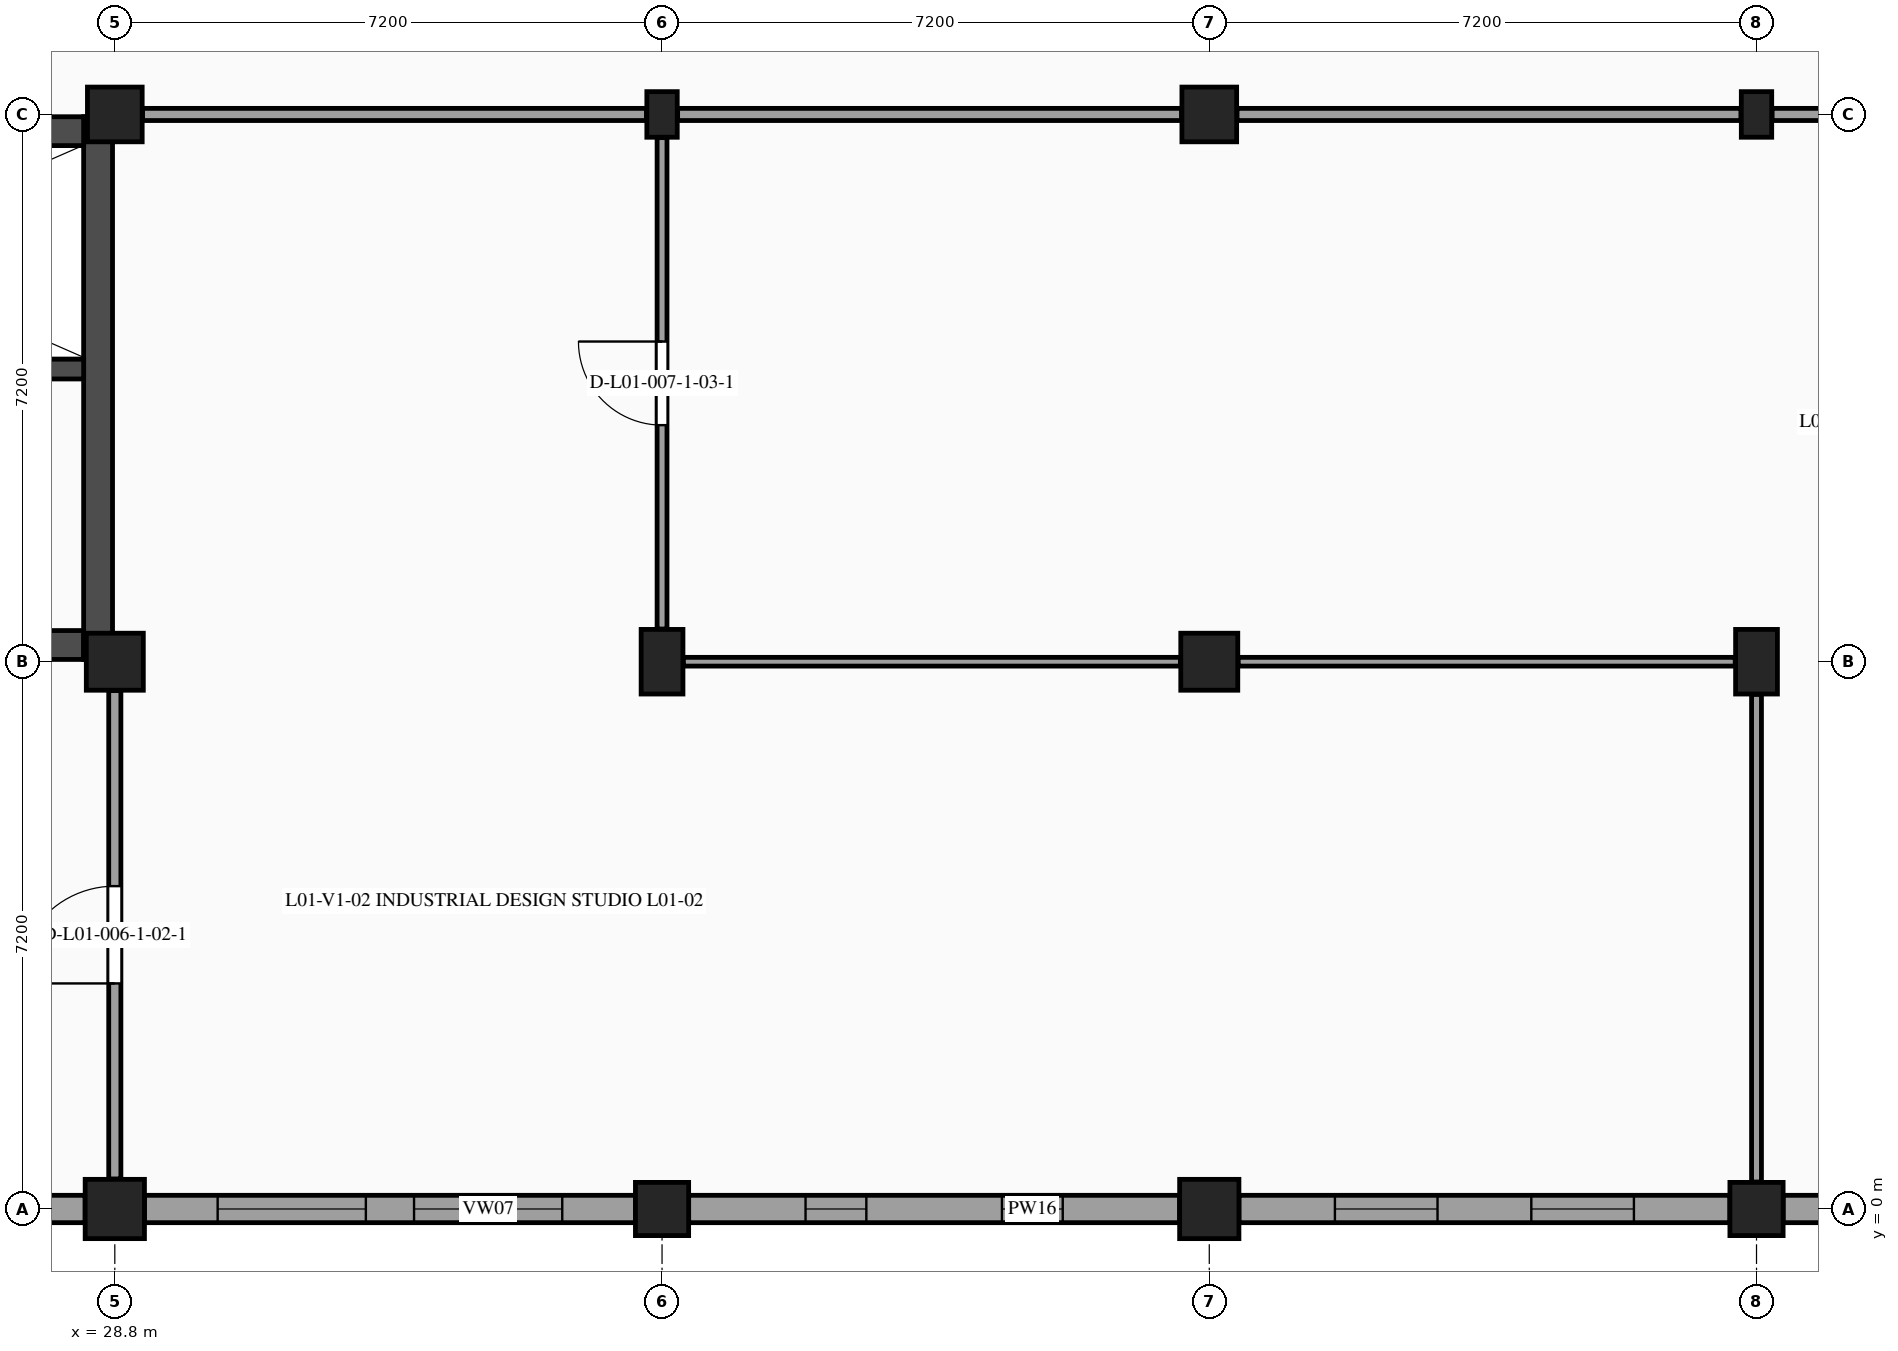
"""IFC4 building model, lengths in metres.
Left out: names, types, materials, properties, quantities, classifications, styles, units other than length and angle.
Written with IfcOpenShell. Run it as: python <this file> out.ifc"""

import sys

from ifc_helpers import new_model, si_unit, direction, frame, frame_2d, origin, origin_2d, place, context, subcontext, project, spatial, rectangle, extrude, element, fill, save


model = new_model("IFC4")
c1 = context("Model", 3, precision=1e-05, world=origin(), true_north=direction((0.0, 1.0)))
c2 = subcontext(c1, "Body", "Model", "MODEL_VIEW")
j1 = project(units=[si_unit("LENGTHUNIT", "METRE"), si_unit("PLANEANGLEUNIT", "RADIAN")], contexts=[c1])
p1 = place(None, origin())
s1 = spatial("IfcSite", under=j1, at=p1, CompositionType="ELEMENT")
p2 = place(p1, origin())
s2 = spatial("IfcBuilding", under=s1, at=p2, CompositionType="ELEMENT")
p3 = place(p2, frame((0.0, 0.0, 5.4)))
s3 = spatial("IfcBuildingStorey", under=s2, at=p3, CompositionType="ELEMENT", Elevation=5.4)
p4 = place(p3, frame((28.8, 0.0, 0.0), z_axis=(0.0, 0.0, 1.0), x_axis=(1.0, 0.0, 0.0)))
e1 = element("IfcColumn", 1, at=p4, inside=s3, PredefinedType="COLUMN", context=c2, shape_type="SweptSolid", body=[
    extrude(rectangle(XDim=0.78, YDim=0.78, at=origin_2d()), origin(), (0.0, 0.0, 1.0), 4.5),
])
p5 = place(p3, frame((28.8, 7.2, 0.0), z_axis=(0.0, 0.0, 1.0), x_axis=(1.0, 0.0, 0.0)))
e2 = element("IfcColumn", 2, at=p5, inside=s3, PredefinedType="COLUMN", context=c2, shape_type="SweptSolid", body=[
    extrude(rectangle(XDim=0.75, YDim=0.75, at=origin_2d()), origin(), (0.0, 0.0, 1.0), 4.5),
])
p6 = place(p3, frame((28.8, 14.4, 0.0), z_axis=(0.0, 0.0, 1.0), x_axis=(1.0, 0.0, 0.0)))
e3 = element("IfcColumn", 3, at=p6, inside=s3, PredefinedType="COLUMN", context=c2, shape_type="SweptSolid", body=[
    extrude(rectangle(XDim=0.72, YDim=0.72, at=origin_2d()), origin(), (0.0, 0.0, 1.0), 4.5),
])
p7 = place(p3, frame((36.0, 0.0, 0.0), z_axis=(0.0, 0.0, 1.0), x_axis=(1.0, 0.0, 0.0)))
e4 = element("IfcColumn", 4, at=p7, inside=s3, PredefinedType="COLUMN", context=c2, shape_type="SweptSolid", body=[
    extrude(rectangle(XDim=0.7, YDim=0.7, at=origin_2d()), origin(), (0.0, 0.0, 1.0), 4.5),
])
p8 = place(p3, frame((36.0, 7.2, 0.0), z_axis=(0.0, 0.0, 1.0), x_axis=(1.0, 0.0, 0.0)))
e5 = element("IfcColumn", 5, at=p8, inside=s3, PredefinedType="COLUMN", context=c2, shape_type="SweptSolid", body=[
    extrude(rectangle(XDim=0.55, YDim=0.85, at=origin_2d()), origin(), (0.0, 0.0, 1.0), 4.5),
])
p9 = place(p3, frame((36.0, 14.4, 0.0), z_axis=(0.0, 0.0, 1.0), x_axis=(1.0, 0.0, 0.0)))
e6 = element("IfcColumn", 6, at=p9, inside=s3, PredefinedType="PILASTER", context=c2, shape_type="SweptSolid", body=[
    extrude(rectangle(XDim=0.4, YDim=0.6, at=origin_2d()), origin(), (0.0, 0.0, 1.0), 4.5),
])
p10 = place(p3, frame((43.2, 0.0, 0.0), z_axis=(0.0, 0.0, 1.0), x_axis=(1.0, 0.0, 0.0)))
e7 = element("IfcColumn", 7, at=p10, inside=s3, PredefinedType="COLUMN", context=c2, shape_type="SweptSolid", body=[
    extrude(rectangle(XDim=0.78, YDim=0.78, at=origin_2d()), origin(), (0.0, 0.0, 1.0), 4.5),
])
p11 = place(p3, frame((43.2, 7.2, 0.0), z_axis=(0.0, 0.0, 1.0), x_axis=(1.0, 0.0, 0.0)))
e8 = element("IfcColumn", 8, at=p11, inside=s3, PredefinedType="COLUMN", context=c2, shape_type="SweptSolid", body=[
    extrude(rectangle(XDim=0.75, YDim=0.75, at=origin_2d()), origin(), (0.0, 0.0, 1.0), 4.5),
])
p12 = place(p3, frame((43.2, 14.4, 0.0), z_axis=(0.0, 0.0, 1.0), x_axis=(1.0, 0.0, 0.0)))
e9 = element("IfcColumn", 9, at=p12, inside=s3, PredefinedType="COLUMN", context=c2, shape_type="SweptSolid", body=[
    extrude(rectangle(XDim=0.72, YDim=0.72, at=origin_2d()), origin(), (0.0, 0.0, 1.0), 4.5),
])
p13 = place(p3, frame((50.4, 0.0, 0.0), z_axis=(0.0, 0.0, 1.0), x_axis=(1.0, 0.0, 0.0)))
e10 = element("IfcColumn", 10, at=p13, inside=s3, PredefinedType="COLUMN", context=c2, shape_type="SweptSolid", body=[
    extrude(rectangle(XDim=0.7, YDim=0.7, at=origin_2d()), origin(), (0.0, 0.0, 1.0), 4.5),
])
p14 = place(p3, frame((50.4, 7.2, 0.0), z_axis=(0.0, 0.0, 1.0), x_axis=(1.0, 0.0, 0.0)))
e11 = element("IfcColumn", 11, at=p14, inside=s3, PredefinedType="COLUMN", context=c2, shape_type="SweptSolid", body=[
    extrude(rectangle(XDim=0.55, YDim=0.85, at=origin_2d()), origin(), (0.0, 0.0, 1.0), 4.5),
])
p15 = place(p3, frame((50.4, 14.4, 0.0), z_axis=(0.0, 0.0, 1.0), x_axis=(1.0, 0.0, 0.0)))
e12 = element("IfcColumn", 12, at=p15, inside=s3, PredefinedType="PILASTER", context=c2, shape_type="SweptSolid", body=[
    extrude(rectangle(XDim=0.4, YDim=0.6, at=origin_2d()), origin(), (0.0, 0.0, 1.0), 4.5),
])
p16 = place(p3, frame((57.225, 0.0, 0.0), z_axis=(0.0, 0.0, 1.0), x_axis=(-1.0, 0.0, 0.0)))
e13 = element("IfcWall", 13, at=p16, inside=s3, PredefinedType="STANDARD", context=c2, shape_type="SweptSolid", body=[
    extrude(rectangle(XDim=6.475, YDim=0.36, at=frame_2d((3.238, 0.0))), origin(), (0.0, 0.0, 1.0), 3.49),
])
p17 = place(p16, frame((1.192, 0.0, 1.15)))
e14 = element("IfcOpeningElement", 14, at=p17, cuts=e13, PredefinedType="OPENING", context=c2, shape_type="SweptSolid", body=[
    extrude(rectangle(XDim=1.5, YDim=1.2, at=frame_2d((0.75, 0.6))), frame((0.0, 0.19, 0.0), z_axis=(0.0, -1.0, 0.0), x_axis=(1.0, 0.0, 0.0)), (0.0, 0.0, 1.0), 0.38),
])
p18 = place(p16, frame((3.782, 0.0, 1.15)))
e15 = element("IfcOpeningElement", 15, at=p18, cuts=e13, PredefinedType="OPENING", context=c2, shape_type="SweptSolid", body=[
    extrude(rectangle(XDim=1.5, YDim=1.2, at=frame_2d((0.75, 0.6))), frame((0.0, 0.19, 0.0), z_axis=(0.0, -1.0, 0.0), x_axis=(1.0, 0.0, 0.0)), (0.0, 0.0, 1.0), 0.38),
])
p19 = place(p3, frame((50.05, 0.0, 0.0), z_axis=(0.0, 0.0, 1.0), x_axis=(-1.0, 0.0, 0.0)))
e16 = element("IfcWall", 16, at=p19, inside=s3, PredefinedType="STANDARD", context=c2, shape_type="SweptSolid", body=[
    extrude(rectangle(XDim=6.46, YDim=0.36, at=frame_2d((3.23, 0.0))), origin(), (0.0, 0.0, 1.0), 3.49),
])
p20 = place(p19, frame((1.263, 0.0, 1.15)))
e17 = element("IfcOpeningElement", 17, at=p20, cuts=e16, PredefinedType="OPENING", context=c2, shape_type="SweptSolid", body=[
    extrude(rectangle(XDim=1.35, YDim=1.1, at=frame_2d((0.675, 0.55))), frame((0.0, 0.19, 0.0), z_axis=(0.0, -1.0, 0.0), x_axis=(1.0, 0.0, 0.0)), (0.0, 0.0, 1.0), 0.38),
])
p21 = place(p19, frame((3.847, 0.0, 1.15)))
e18 = element("IfcOpeningElement", 18, at=p21, cuts=e16, PredefinedType="OPENING", context=c2, shape_type="SweptSolid", body=[
    extrude(rectangle(XDim=1.35, YDim=1.1, at=frame_2d((0.675, 0.55))), frame((0.0, 0.19, 0.0), z_axis=(0.0, -1.0, 0.0), x_axis=(1.0, 0.0, 0.0)), (0.0, 0.0, 1.0), 0.38),
])
p22 = place(p3, frame((42.81, 0.0, 0.0), z_axis=(0.0, 0.0, 1.0), x_axis=(-1.0, 0.0, 0.0)))
e19 = element("IfcWall", 19, at=p22, inside=s3, PredefinedType="STANDARD", context=c2, shape_type="SweptSolid", body=[
    extrude(rectangle(XDim=6.46, YDim=0.36, at=frame_2d((3.23, 0.0))), origin(), (0.0, 0.0, 1.0), 3.49),
])
p23 = place(p22, frame((1.538, 0.0, 1.15)))
e20 = element("IfcOpeningElement", 20, at=p23, cuts=e19, PredefinedType="OPENING", context=c2, shape_type="SweptSolid", body=[
    extrude(rectangle(XDim=0.8, YDim=1.5, at=frame_2d((0.4, 0.75))), frame((0.0, 0.19, 0.0), z_axis=(0.0, -1.0, 0.0), x_axis=(1.0, 0.0, 0.0)), (0.0, 0.0, 1.0), 0.38),
])
p24 = place(p22, frame((4.122, 0.0, 1.15)))
e21 = element("IfcOpeningElement", 21, at=p24, cuts=e19, PredefinedType="OPENING", context=c2, shape_type="SweptSolid", body=[
    extrude(rectangle(XDim=0.8, YDim=1.5, at=frame_2d((0.4, 0.75))), frame((0.0, 0.19, 0.0), z_axis=(0.0, -1.0, 0.0), x_axis=(1.0, 0.0, 0.0)), (0.0, 0.0, 1.0), 0.38),
])
p25 = place(p3, frame((35.65, 0.0, 0.0), z_axis=(0.0, 0.0, 1.0), x_axis=(-1.0, 0.0, 0.0)))
e22 = element("IfcWall", 22, at=p25, inside=s3, PredefinedType="STANDARD", context=c2, shape_type="SweptSolid", body=[
    extrude(rectangle(XDim=6.46, YDim=0.36, at=frame_2d((3.23, 0.0))), origin(), (0.0, 0.0, 1.0), 3.49),
])
p26 = place(p25, frame((0.963, 0.0, 1.15)))
e23 = element("IfcOpeningElement", 23, at=p26, cuts=e22, PredefinedType="OPENING", context=c2, shape_type="SweptSolid", body=[
    extrude(rectangle(XDim=1.95, YDim=1.4, at=frame_2d((0.975, 0.7))), frame((0.0, 0.19, 0.0), z_axis=(0.0, -1.0, 0.0), x_axis=(1.0, 0.0, 0.0)), (0.0, 0.0, 1.0), 0.38),
])
p27 = place(p25, frame((3.547, 0.0, 1.15)))
e24 = element("IfcOpeningElement", 24, at=p27, cuts=e22, PredefinedType="OPENING", context=c2, shape_type="SweptSolid", body=[
    extrude(rectangle(XDim=1.95, YDim=1.4, at=frame_2d((0.975, 0.7))), frame((0.0, 0.19, 0.0), z_axis=(0.0, -1.0, 0.0), x_axis=(1.0, 0.0, 0.0)), (0.0, 0.0, 1.0), 0.38),
])
p28 = place(p3, frame((28.41, 0.0, 0.0), z_axis=(0.0, 0.0, 1.0), x_axis=(-1.0, 0.0, 0.0)))
e25 = element("IfcWall", 25, at=p28, inside=s3, PredefinedType="STANDARD", context=c2, shape_type="SweptSolid", body=[
    extrude(rectangle(XDim=6.46, YDim=0.36, at=frame_2d((3.23, 0.0))), origin(), (0.0, 0.0, 1.0), 3.49),
])
p29 = place(p28, frame((1.063, 0.0, 1.15)))
e26 = element("IfcOpeningElement", 26, at=p29, cuts=e25, PredefinedType="OPENING", context=c2, shape_type="SweptSolid", body=[
    extrude(rectangle(XDim=1.75, YDim=1.4, at=frame_2d((0.875, 0.7))), frame((0.0, 0.19, 0.0), z_axis=(0.0, -1.0, 0.0), x_axis=(1.0, 0.0, 0.0)), (0.0, 0.0, 1.0), 0.38),
])
p30 = place(p28, frame((3.647, 0.0, 1.15)))
e27 = element("IfcOpeningElement", 27, at=p30, cuts=e25, PredefinedType="OPENING", context=c2, shape_type="SweptSolid", body=[
    extrude(rectangle(XDim=1.75, YDim=1.4, at=frame_2d((0.875, 0.7))), frame((0.0, 0.19, 0.0), z_axis=(0.0, -1.0, 0.0), x_axis=(1.0, 0.0, 0.0)), (0.0, 0.0, 1.0), 0.38),
])
p31 = place(p3, frame((21.79, 7.42, 0.0), z_axis=(0.0, 0.0, 1.0), x_axis=(1.0, 0.0, 0.0)))
e28 = element("IfcWall", 28, at=p31, inside=s3, PredefinedType="SHEAR", context=c2, shape_type="SweptSolid", body=[
    extrude(rectangle(XDim=6.6, YDim=0.38, at=frame_2d((3.3, 0.0))), origin(), (0.0, 0.0, 1.0), 4.21),
])
p32 = place(p31, frame((2.22, 0.0, 0.0)))
e29 = element("IfcOpeningElement", 29, at=p32, cuts=e28, PredefinedType="OPENING", context=c2, shape_type="SweptSolid", body=[
    extrude(rectangle(XDim=1.8, YDim=2.2, at=frame_2d((0.9, 1.1))), frame((0.0, 0.2, 0.0), z_axis=(0.0, -1.0, 0.0), x_axis=(1.0, 0.0, 0.0)), (0.0, 0.0, 1.0), 0.4),
])
p33 = place(p3, frame((28.58, 7.23, 0.0), z_axis=(0.0, 0.0, 1.0), x_axis=(0.0, 1.0, 0.0)))
e30 = element("IfcWall", 30, at=p33, inside=s3, PredefinedType="SHEAR", context=c2, shape_type="SweptSolid", body=[
    extrude(rectangle(XDim=7.14, YDim=0.38, at=frame_2d((3.57, 0.0))), origin(), (0.0, 0.0, 1.0), 4.21),
])
p34 = place(p3, frame((21.79, 14.18, 0.0), z_axis=(0.0, 0.0, 1.0), x_axis=(1.0, 0.0, 0.0)))
e31 = element("IfcWall", 31, at=p34, inside=s3, PredefinedType="SHEAR", context=c2, shape_type="SweptSolid", body=[
    extrude(rectangle(XDim=6.6, YDim=0.38, at=frame_2d((3.3, 0.0))), origin(), (0.0, 0.0, 1.0), 4.21),
])
p35 = place(p3, frame((21.79, 11.05, 0.0), z_axis=(0.0, 0.0, 1.0), x_axis=(1.0, 0.0, 0.0)))
e32 = element("IfcWall", 32, at=p35, inside=s3, PredefinedType="SHEAR", context=c2, shape_type="SweptSolid", body=[
    extrude(rectangle(XDim=6.6, YDim=0.26, at=frame_2d((3.3, 0.0))), origin(), (0.0, 0.0, 1.0), 4.21),
])
p36 = place(p35, frame((0.95, 0.0, 0.0)))
e33 = element("IfcOpeningElement", 33, at=p36, cuts=e32, PredefinedType="OPENING", context=c2, shape_type="SweptSolid", body=[
    extrude(rectangle(XDim=1.1, YDim=2.2, at=frame_2d((0.55, 1.1))), frame((0.0, 0.14, 0.0), z_axis=(0.0, -1.0, 0.0), x_axis=(1.0, 0.0, 0.0)), (0.0, 0.0, 1.0), 0.28),
])
p37 = place(p35, frame((4.1, 0.0, 0.0)))
e34 = element("IfcOpeningElement", 34, at=p37, cuts=e32, PredefinedType="OPENING", context=c2, shape_type="SweptSolid", body=[
    extrude(rectangle(XDim=1.0, YDim=2.15, at=frame_2d((0.5, 1.075))), frame((0.0, 0.14, 0.0), z_axis=(0.0, -1.0, 0.0), x_axis=(1.0, 0.0, 0.0)), (0.0, 0.0, 1.0), 0.28),
])
p38 = place(p3, frame((28.8, 0.395, 0.0), z_axis=(0.0, 0.0, 1.0), x_axis=(0.0, 1.0, 0.0)))
e35 = element("IfcWall", 35, at=p38, inside=s3, PredefinedType="PARTITIONING", context=c2, shape_type="SweptSolid", body=[
    extrude(rectangle(XDim=6.425, YDim=0.16, at=frame_2d((3.212, 0.0))), origin(), (0.0, 0.0, 1.0), 3.525),
])
p39 = place(p38, frame((2.573, 0.0, 0.0)))
e36 = element("IfcOpeningElement", 36, at=p39, cuts=e35, PredefinedType="OPENING", context=c2, shape_type="SweptSolid", body=[
    extrude(rectangle(XDim=1.28, YDim=2.24, at=frame_2d((0.64, 1.12))), frame((0.0, 0.09, 0.0), z_axis=(0.0, -1.0, 0.0), x_axis=(1.0, 0.0, 0.0)), (0.0, 0.0, 1.0), 0.18),
])
p40 = place(p3, frame((36.0, 7.63, 0.0), z_axis=(0.0, 0.0, 1.0), x_axis=(0.0, 1.0, 0.0)))
e37 = element("IfcWall", 37, at=p40, inside=s3, PredefinedType="PARTITIONING", context=c2, shape_type="SweptSolid", body=[
    extrude(rectangle(XDim=6.465, YDim=0.13, at=frame_2d((3.232, 0.0))), origin(), (0.0, 0.0, 1.0), 3.525),
])
p41 = place(p40, frame((2.683, 0.0, 0.0)))
e38 = element("IfcOpeningElement", 38, at=p41, cuts=e37, PredefinedType="OPENING", context=c2, shape_type="SweptSolid", body=[
    extrude(rectangle(XDim=1.1, YDim=2.15, at=frame_2d((0.55, 1.075))), frame((0.0, 0.075, 0.0), z_axis=(0.0, -1.0, 0.0), x_axis=(1.0, 0.0, 0.0)), (0.0, 0.0, 1.0), 0.15),
])
p42 = place(p3, frame((29.165, 14.4, 0.0), z_axis=(0.0, 0.0, 1.0), x_axis=(1.0, 0.0, 0.0)))
e39 = element("IfcWall", 39, at=p42, inside=s3, PredefinedType="PARTITIONING", context=c2, shape_type="SweptSolid", body=[
    extrude(rectangle(XDim=6.63, YDim=0.16, at=frame_2d((3.315, 0.0))), origin(), (0.0, 0.0, 1.0), 3.51),
])
p43 = place(p3, frame((36.28, 7.2, 0.0), z_axis=(0.0, 0.0, 1.0), x_axis=(1.0, 0.0, 0.0)))
e40 = element("IfcWall", 40, at=p43, inside=s3, PredefinedType="PARTITIONING", context=c2, shape_type="SweptSolid", body=[
    extrude(rectangle(XDim=6.54, YDim=0.115, at=frame_2d((3.27, 0.0))), origin(), (0.0, 0.0, 1.0), 3.55),
])
p44 = place(p3, frame((36.205, 14.4, 0.0), z_axis=(0.0, 0.0, 1.0), x_axis=(1.0, 0.0, 0.0)))
e41 = element("IfcWall", 41, at=p44, inside=s3, PredefinedType="PARTITIONING", context=c2, shape_type="SweptSolid", body=[
    extrude(rectangle(XDim=6.63, YDim=0.16, at=frame_2d((3.315, 0.0))), origin(), (0.0, 0.0, 1.0), 3.55),
])
p45 = place(p3, frame((50.4, 0.355, 0.0), z_axis=(0.0, 0.0, 1.0), x_axis=(0.0, 1.0, 0.0)))
e42 = element("IfcWall", 42, at=p45, inside=s3, PredefinedType="PARTITIONING", context=c2, shape_type="SweptSolid", body=[
    extrude(rectangle(XDim=6.415, YDim=0.13, at=frame_2d((3.208, 0.0))), origin(), (0.0, 0.0, 1.0), 3.525),
])
p46 = place(p3, frame((43.58, 7.2, 0.0), z_axis=(0.0, 0.0, 1.0), x_axis=(1.0, 0.0, 0.0)))
e43 = element("IfcWall", 43, at=p46, inside=s3, PredefinedType="PARTITIONING", context=c2, shape_type="SweptSolid", body=[
    extrude(rectangle(XDim=6.54, YDim=0.115, at=frame_2d((3.27, 0.0))), origin(), (0.0, 0.0, 1.0), 3.56),
])
p47 = place(p3, frame((43.565, 14.4, 0.0), z_axis=(0.0, 0.0, 1.0), x_axis=(1.0, 0.0, 0.0)))
e44 = element("IfcWall", 44, at=p47, inside=s3, PredefinedType="PARTITIONING", context=c2, shape_type="SweptSolid", body=[
    extrude(rectangle(XDim=6.63, YDim=0.16, at=frame_2d((3.315, 0.0))), origin(), (0.0, 0.0, 1.0), 3.56),
])
p48 = place(p3, frame((50.605, 14.4, 0.0), z_axis=(0.0, 0.0, 1.0), x_axis=(1.0, 0.0, 0.0)))
e45 = element("IfcWall", 45, at=p48, inside=s3, PredefinedType="PARTITIONING", context=c2, shape_type="SweptSolid", body=[
    extrude(rectangle(XDim=6.615, YDim=0.16, at=frame_2d((3.308, 0.0))), origin(), (0.0, 0.0, 1.0), 3.57),
])
p49 = place(p20, origin())
e46 = element("IfcWindow", 46, at=p49, inside=s3, PartitioningType="SINGLE_PANEL", PredefinedType="WINDOW", context=c2, shape_type="SweptSolid", body=[
    extrude(rectangle(XDim=1.35, YDim=1.1, at=frame_2d((0.675, 0.55))), frame((0.0, -0.08, 0.0), z_axis=(0.0, -1.0, 0.0), x_axis=(1.0, 0.0, 0.0)), (0.0, 0.0, 1.0), 0.06),
])
fill(e17, e46)
p50 = place(p21, origin())
e47 = element("IfcWindow", 47, at=p50, inside=s3, PartitioningType="SINGLE_PANEL", PredefinedType="WINDOW", context=c2, shape_type="SweptSolid", body=[
    extrude(rectangle(XDim=1.35, YDim=1.1, at=frame_2d((0.675, 0.55))), frame((0.0, -0.08, 0.0), z_axis=(0.0, -1.0, 0.0), x_axis=(1.0, 0.0, 0.0)), (0.0, 0.0, 1.0), 0.06),
])
fill(e18, e47)
p51 = place(p23, origin())
e48 = element("IfcWindow", 48, at=p51, inside=s3, PartitioningType="SINGLE_PANEL", PredefinedType="WINDOW", context=c2, shape_type="SweptSolid", body=[
    extrude(rectangle(XDim=0.8, YDim=1.5, at=frame_2d((0.4, 0.75))), frame((0.0, -0.08, 0.0), z_axis=(0.0, -1.0, 0.0), x_axis=(1.0, 0.0, 0.0)), (0.0, 0.0, 1.0), 0.06),
])
fill(e20, e48)
p52 = place(p24, origin())
e49 = element("IfcWindow", 49, at=p52, inside=s3, PartitioningType="SINGLE_PANEL", PredefinedType="WINDOW", context=c2, shape_type="SweptSolid", body=[
    extrude(rectangle(XDim=0.8, YDim=1.5, at=frame_2d((0.4, 0.75))), frame((0.0, -0.08, 0.0), z_axis=(0.0, -1.0, 0.0), x_axis=(1.0, 0.0, 0.0)), (0.0, 0.0, 1.0), 0.06),
])
fill(e21, e49)
p53 = place(p26, origin())
e50 = element("IfcWindow", 50, at=p53, inside=s3, PartitioningType="SINGLE_PANEL", PredefinedType="WINDOW", context=c2, shape_type="SweptSolid", body=[
    extrude(rectangle(XDim=1.95, YDim=1.4, at=frame_2d((0.975, 0.7))), frame((0.0, -0.08, 0.0), z_axis=(0.0, -1.0, 0.0), x_axis=(1.0, 0.0, 0.0)), (0.0, 0.0, 1.0), 0.06),
])
fill(e23, e50)
p54 = place(p27, origin())
e51 = element("IfcWindow", 51, at=p54, inside=s3, PartitioningType="SINGLE_PANEL", PredefinedType="WINDOW", context=c2, shape_type="SweptSolid", body=[
    extrude(rectangle(XDim=1.95, YDim=1.4, at=frame_2d((0.975, 0.7))), frame((0.0, -0.08, 0.0), z_axis=(0.0, -1.0, 0.0), x_axis=(1.0, 0.0, 0.0)), (0.0, 0.0, 1.0), 0.06),
])
fill(e24, e51)
p55 = place(p39, origin())
e52 = element("IfcDoor", 52, at=p55, inside=s3, OperationType="SINGLE_SWING_LEFT", PredefinedType="DOOR", context=c2, shape_type="SweptSolid", body=[
    extrude(rectangle(XDim=1.28, YDim=2.24, at=frame_2d((0.64, 1.12))), frame((0.0, 0.025, 0.0), z_axis=(0.0, -1.0, 0.0), x_axis=(1.0, 0.0, 0.0)), (0.0, 0.0, 1.0), 0.05),
])
fill(e36, e52)
p56 = place(p41, origin())
e53 = element("IfcDoor", 53, at=p56, inside=s3, OperationType="SINGLE_SWING_RIGHT", PredefinedType="DOOR", context=c2, shape_type="SweptSolid", body=[
    extrude(rectangle(XDim=1.1, YDim=2.15, at=frame_2d((0.55, 1.075))), frame((0.0, 0.025, 0.0), z_axis=(0.0, -1.0, 0.0), x_axis=(1.0, 0.0, 0.0)), (0.0, 0.0, 1.0), 0.05),
])
fill(e38, e53)
save(model, sys.argv[1])
